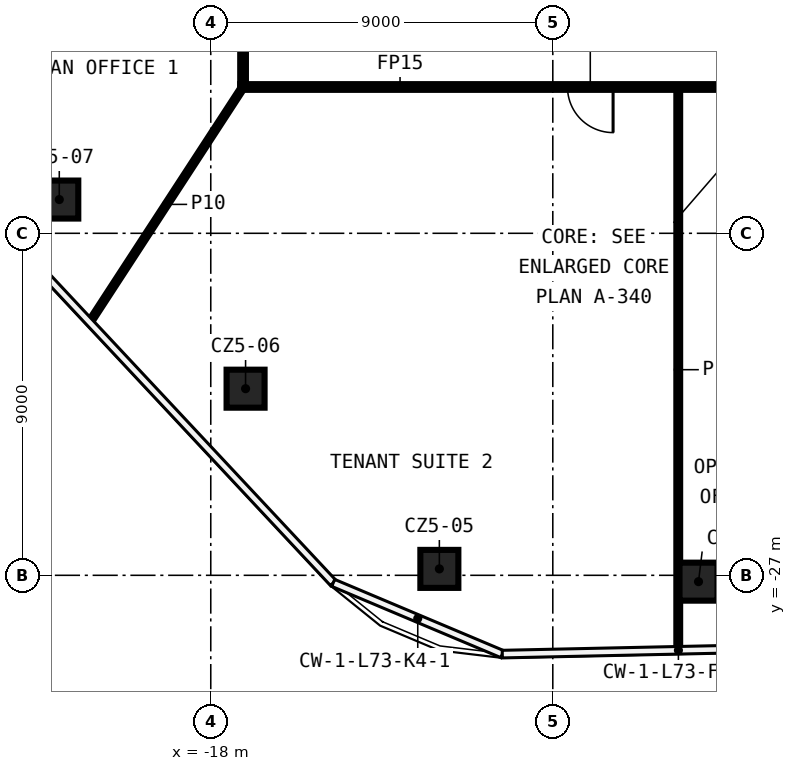
"""IFC4 building model, lengths in metres.
Left out: names, types, materials, properties, quantities, classifications, styles, units other than length and angle.
Written with IfcOpenShell. Run it as: python <this file> out.ifc"""

import sys

from ifc_helpers import new_model, si_unit, direction, frame, frame_2d, origin, origin_2d, place, context, subcontext, project, spatial, rectangle, extrude, element, fill, save


model = new_model("IFC4")
c1 = context("Model", 3, precision=1e-05, world=origin(), true_north=direction((0.0, 1.0)))
c2 = subcontext(c1, "Body", "Model", "MODEL_VIEW")
j1 = project(units=[si_unit("LENGTHUNIT", "METRE"), si_unit("PLANEANGLEUNIT", "RADIAN")], contexts=[c1])
p1 = place(None, origin())
s1 = spatial("IfcSite", under=j1, at=p1, CompositionType="ELEMENT")
p2 = place(p1, origin())
s2 = spatial("IfcBuilding", under=s1, at=p2, CompositionType="ELEMENT")
p3 = place(p2, frame((0.0, 0.0, 340.4)))
s3 = spatial("IfcBuildingStorey", under=s2, at=p3, CompositionType="ELEMENT", Elevation=340.4)
for number, where, z_axis, x_axis in (
    (1, (-5.166, -27.167, 0.0), (0.0, 0.0, 1.0), (1.0, 0.0, 0.0)),
    (2, (-11.985, -26.831, 0.0), (0.0, 0.0, 1.0), (1.0, 0.0, 0.0)),
    (3, (-17.084, -22.089, 0.0), (0.0, 0.0, 1.0), (1.0, 0.0, 0.0)),
    (4, (-21.986, -17.112, 0.0), (0.0, 0.0, 1.0), (1.0, 0.0, 0.0)),
):
    element("IfcColumn", number, at=place(p3, frame(where, z_axis=z_axis, x_axis=x_axis)), inside=s3, PredefinedType="COLUMN", context=c2, shape_type="SweptSolid", body=[
        extrude(rectangle(XDim=1.0, YDim=1.0, at=origin_2d()), origin(), (0.0, 0.0, 1.0), 3.82),
    ])
p4 = place(p3, frame((17.225, -14.15, 0.0), z_axis=(0.0, 0.0, 1.0), x_axis=(-1.0, 0.0, 0.0)))
e5 = element("IfcWall", 5, at=p4, inside=s3, PredefinedType="PARTITIONING", context=c2, shape_type="SweptSolid", body=[
    extrude(rectangle(XDim=34.45, YDim=0.15, at=frame_2d((17.225, 0.0))), origin(), (0.0, 0.0, 1.0), 3.82),
])
p5 = place(p4, frame((24.639, 0.0, 0.0)))
e6 = element("IfcOpeningElement", 6, at=p5, cuts=e5, PredefinedType="OPENING", context=c2, shape_type="SweptSolid", body=[
    extrude(rectangle(XDim=1.2, YDim=2.1, at=frame_2d((0.6, 1.05))), frame((0.0, 0.085, 0.0), z_axis=(0.0, -1.0, 0.0), x_axis=(1.0, 0.0, 0.0)), (0.0, 0.0, 1.0), 0.17),
])
p6 = place(p4, frame((20.005, 0.0, 0.0)))
e7 = element("IfcOpeningElement", 7, at=p6, cuts=e5, PredefinedType="OPENING", context=c2, shape_type="SweptSolid", body=[
    extrude(rectangle(XDim=1.2, YDim=2.1, at=frame_2d((0.6, 1.05))), frame((0.0, 0.085, 0.0), z_axis=(0.0, -1.0, 0.0), x_axis=(1.0, 0.0, 0.0)), (0.0, 0.0, 1.0), 0.17),
])
p7 = place(p4, frame((15.367, 0.0, 0.0)))
e8 = element("IfcOpeningElement", 8, at=p7, cuts=e5, PredefinedType="OPENING", context=c2, shape_type="SweptSolid", body=[
    extrude(rectangle(XDim=1.2, YDim=2.1, at=frame_2d((0.6, 1.05))), frame((0.0, 0.085, 0.0), z_axis=(0.0, -1.0, 0.0), x_axis=(1.0, 0.0, 0.0)), (0.0, 0.0, 1.0), 0.17),
])
p8 = place(p4, frame((10.73, 0.0, 0.0)))
e9 = element("IfcOpeningElement", 9, at=p8, cuts=e5, PredefinedType="OPENING", context=c2, shape_type="SweptSolid", body=[
    extrude(rectangle(XDim=1.2, YDim=2.1, at=frame_2d((0.6, 1.05))), frame((0.0, 0.085, 0.0), z_axis=(0.0, -1.0, 0.0), x_axis=(1.0, 0.0, 0.0)), (0.0, 0.0, 1.0), 0.17),
])
p9 = place(p4, frame((6.097, 0.0, 0.0)))
e10 = element("IfcOpeningElement", 10, at=p9, cuts=e5, PredefinedType="OPENING", context=c2, shape_type="SweptSolid", body=[
    extrude(rectangle(XDim=1.2, YDim=2.1, at=frame_2d((0.6, 1.05))), frame((0.0, 0.085, 0.0), z_axis=(0.0, -1.0, 0.0), x_axis=(1.0, 0.0, 0.0)), (0.0, 0.0, 1.0), 0.17),
])
p10 = place(p4, frame((1.83, 0.0, 0.0)))
e11 = element("IfcOpeningElement", 11, at=p10, cuts=e5, PredefinedType="OPENING", context=c2, shape_type="SweptSolid", body=[
    extrude(rectangle(XDim=1.2, YDim=2.1, at=frame_2d((0.6, 1.05))), frame((0.0, 0.085, 0.0), z_axis=(0.0, -1.0, 0.0), x_axis=(1.0, 0.0, 0.0)), (0.0, 0.0, 1.0), 0.17),
])
p11 = place(p3, frame((-21.176, -20.328, 0.0), z_axis=(0.0, 0.0, 1.0), x_axis=(0.5459597113, 0.837811430834, 0.0)))
e12 = element("IfcWall", 12, at=p11, inside=s3, PredefinedType="PARTITIONING", context=c2, shape_type="SweptSolid", body=[
    extrude(rectangle(XDim=7.374, YDim=0.1, at=frame_2d((3.687, 0.0))), origin(), (0.0, 0.0, 1.0), 3.82),
])
p12 = place(p3, frame((-5.699, -28.953, 0.0), z_axis=(0.0, 0.0, 1.0), x_axis=(0.0, 1.0, 0.0)))
e13 = element("IfcWall", 13, at=p12, inside=s3, PredefinedType="PARTITIONING", context=c2, shape_type="SweptSolid", body=[
    extrude(rectangle(XDim=14.728, YDim=0.1, at=frame_2d((7.364, 0.0))), origin(), (0.0, 0.0, 1.0), 3.82),
])
p13 = place(p3, frame((-17.15, -14.075, 0.0), z_axis=(0.0, 0.0, 1.0), x_axis=(0.0, 1.0, 0.0)))
e14 = element("IfcWall", 14, at=p13, inside=s3, PredefinedType="PARTITIONING", context=c2, shape_type="SweptSolid", body=[
    extrude(rectangle(XDim=28.15, YDim=0.15, at=frame_2d((14.075, 0.0))), origin(), (0.0, 0.0, 1.0), 3.82),
])
p14 = place(p13, frame((11.122, 0.0, 0.0)))
e15 = element("IfcOpeningElement", 15, at=p14, cuts=e14, PredefinedType="OPENING", context=c2, shape_type="SweptSolid", body=[
    extrude(rectangle(XDim=1.2, YDim=2.1, at=frame_2d((0.6, 1.05))), frame((0.0, 0.085, 0.0), z_axis=(0.0, -1.0, 0.0), x_axis=(1.0, 0.0, 0.0)), (0.0, 0.0, 1.0), 0.17),
])
p15 = place(p13, frame((5.555, 0.0, 0.0)))
e16 = element("IfcOpeningElement", 16, at=p15, cuts=e14, PredefinedType="OPENING", context=c2, shape_type="SweptSolid", body=[
    extrude(rectangle(XDim=1.2, YDim=2.1, at=frame_2d((0.6, 1.05))), frame((0.0, 0.085, 0.0), z_axis=(0.0, -1.0, 0.0), x_axis=(1.0, 0.0, 0.0)), (0.0, 0.0, 1.0), 0.17),
])
p16 = place(p13, frame((1.7, 0.0, 0.0)))
e17 = element("IfcOpeningElement", 17, at=p16, cuts=e14, PredefinedType="OPENING", context=c2, shape_type="SweptSolid", body=[
    extrude(rectangle(XDim=1.2, YDim=2.1, at=frame_2d((0.6, 1.05))), frame((0.0, 0.085, 0.0), z_axis=(0.0, -1.0, 0.0), x_axis=(1.0, 0.0, 0.0)), (0.0, 0.0, 1.0), 0.17),
])
p17 = place(p13, frame((24.457, 0.0, 0.0)))
e18 = element("IfcOpeningElement", 18, at=p17, cuts=e14, PredefinedType="OPENING", context=c2, shape_type="SweptSolid", body=[
    extrude(rectangle(XDim=1.2, YDim=2.1, at=frame_2d((0.6, 1.05))), frame((0.0, 0.085, 0.0), z_axis=(0.0, -1.0, 0.0), x_axis=(1.0, 0.0, 0.0)), (0.0, 0.0, 1.0), 0.17),
])
p18 = place(p13, frame((20.314, 0.0, 0.0)))
e19 = element("IfcOpeningElement", 19, at=p18, cuts=e14, PredefinedType="OPENING", context=c2, shape_type="SweptSolid", body=[
    extrude(rectangle(XDim=1.2, YDim=2.1, at=frame_2d((0.6, 1.05))), frame((0.0, 0.085, 0.0), z_axis=(0.0, -1.0, 0.0), x_axis=(1.0, 0.0, 0.0)), (0.0, 0.0, 1.0), 0.17),
])
p19 = place(p13, frame((16.172, 0.0, 0.0)))
e20 = element("IfcOpeningElement", 20, at=p19, cuts=e14, PredefinedType="OPENING", context=c2, shape_type="SweptSolid", body=[
    extrude(rectangle(XDim=1.2, YDim=2.1, at=frame_2d((0.6, 1.05))), frame((0.0, 0.085, 0.0), z_axis=(0.0, -1.0, 0.0), x_axis=(1.0, 0.0, 0.0)), (0.0, 0.0, 1.0), 0.17),
])
p20 = place(p5, origin())
e21 = element("IfcDoor", 21, at=p20, inside=s3, OperationType="SINGLE_SWING_LEFT", PredefinedType="DOOR", context=c2, shape_type="SweptSolid", body=[
    extrude(rectangle(XDim=1.2, YDim=2.1, at=frame_2d((0.6, 1.05))), frame((0.0, 0.025, 0.0), z_axis=(0.0, -1.0, 0.0), x_axis=(1.0, 0.0, 0.0)), (0.0, 0.0, 1.0), 0.05),
])
fill(e6, e21)
save(model, sys.argv[1])
